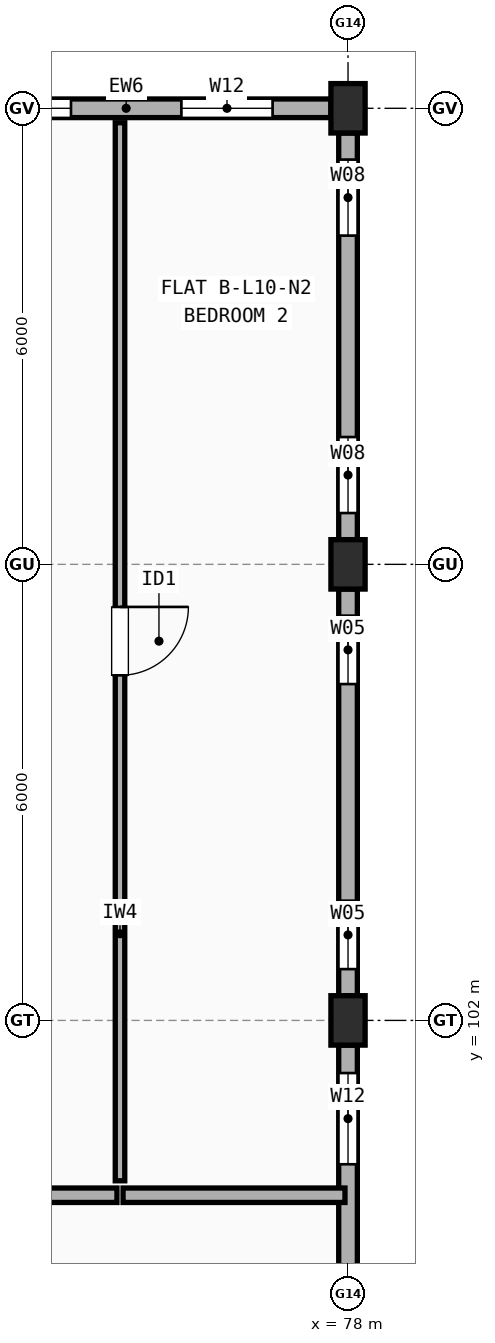
"""IFC4 building model, lengths in metres.
Left out: names, types, materials, properties, quantities, classifications, styles, units other than length and angle.
Written with IfcOpenShell. Run it as: python <this file> out.ifc"""

import sys

from ifc_helpers import new_model, si_unit, direction, frame, frame_2d, origin, origin_2d, place, context, subcontext, project, spatial, rectangle, extrude, element, fill, save


model = new_model("IFC4")
c1 = context("Model", 3, precision=1e-05, world=origin(), true_north=direction((0.0, 1.0)))
c2 = subcontext(c1, "Body", "Model", "MODEL_VIEW")
j1 = project(units=[si_unit("LENGTHUNIT", "METRE"), si_unit("PLANEANGLEUNIT", "RADIAN")], contexts=[c1])
p1 = place(None, origin())
s1 = spatial("IfcSite", under=j1, at=p1, CompositionType="ELEMENT")
p2 = place(p1, origin())
s2 = spatial("IfcBuilding", under=s1, at=p2, CompositionType="ELEMENT")
p3 = place(p2, frame((0.0, 0.0, 33.3)))
s3 = spatial("IfcBuildingStorey", under=s2, at=p3, CompositionType="ELEMENT", Elevation=33.3)
for number, where, z_axis, x_axis in (
    (1, (78.0, 102.0, 0.0), (0.0, 0.0, 1.0), (1.0, 0.0, 0.0)),
    (2, (78.0, 108.0, 0.0), (0.0, 0.0, 1.0), (1.0, 0.0, 0.0)),
    (3, (78.0, 114.0, 0.0), (0.0, 0.0, 1.0), (1.0, 0.0, 0.0)),
):
    element("IfcColumn", number, at=place(p3, frame(where, z_axis=z_axis, x_axis=x_axis)), inside=s3, PredefinedType="COLUMN", context=c2, shape_type="SweptSolid", body=[
        extrude(rectangle(XDim=0.45, YDim=0.65, at=origin_2d()), origin(), (0.0, 0.0, 1.0), 2.99),
    ])
p4 = place(p3, frame((78.0, 96.325, 0.0), z_axis=(0.0, 0.0, 1.0), x_axis=(0.0, 1.0, 0.0)))
e4 = element("IfcWall", 4, at=p4, inside=s3, PredefinedType="STANDARD", context=c2, shape_type="SweptSolid", body=[
    extrude(rectangle(XDim=5.35, YDim=0.245, at=frame_2d((2.675, 0.0))), origin(), (0.0, 0.0, 1.0), 2.472),
])
p5 = place(p4, frame((1.067, 0.0, 0.9)))
e5 = element("IfcOpeningElement", 5, at=p5, cuts=e4, PredefinedType="OPENING", context=c2, shape_type="SweptSolid", body=[
    extrude(rectangle(XDim=1.2, YDim=1.35, at=frame_2d((0.6, 0.675))), frame((0.0, 0.133, 0.0), z_axis=(0.0, -1.0, 0.0), x_axis=(1.0, 0.0, 0.0)), (0.0, 0.0, 1.0), 0.265),
])
p6 = place(p4, frame((3.782, 0.0, 0.9)))
e6 = element("IfcOpeningElement", 6, at=p6, cuts=e4, PredefinedType="OPENING", context=c2, shape_type="SweptSolid", body=[
    extrude(rectangle(XDim=1.2, YDim=1.35, at=frame_2d((0.6, 0.675))), frame((0.0, 0.133, 0.0), z_axis=(0.0, -1.0, 0.0), x_axis=(1.0, 0.0, 0.0)), (0.0, 0.0, 1.0), 0.265),
])
p7 = place(p3, frame((78.0, 102.325, 0.0), z_axis=(0.0, 0.0, 1.0), x_axis=(0.0, 1.0, 0.0)))
e7 = element("IfcWall", 7, at=p7, inside=s3, PredefinedType="STANDARD", context=c2, shape_type="SweptSolid", body=[
    extrude(rectangle(XDim=5.35, YDim=0.245, at=frame_2d((2.675, 0.0))), origin(), (0.0, 0.0, 1.0), 2.472),
])
p8 = place(p7, frame((0.35, 0.0, 0.9)))
e8 = element("IfcOpeningElement", 8, at=p8, cuts=e7, PredefinedType="OPENING", context=c2, shape_type="SweptSolid", body=[
    extrude(rectangle(XDim=0.9, YDim=1.4, at=frame_2d((0.45, 0.7))), frame((0.0, 0.133, 0.0), z_axis=(0.0, -1.0, 0.0), x_axis=(1.0, 0.0, 0.0)), (0.0, 0.0, 1.0), 0.265),
])
p9 = place(p7, frame((4.1, 0.0, 0.9)))
e9 = element("IfcOpeningElement", 9, at=p9, cuts=e7, PredefinedType="OPENING", context=c2, shape_type="SweptSolid", body=[
    extrude(rectangle(XDim=0.9, YDim=1.4, at=frame_2d((0.45, 0.7))), frame((0.0, 0.133, 0.0), z_axis=(0.0, -1.0, 0.0), x_axis=(1.0, 0.0, 0.0)), (0.0, 0.0, 1.0), 0.265),
])
p10 = place(p3, frame((78.0, 108.325, 0.0), z_axis=(0.0, 0.0, 1.0), x_axis=(0.0, 1.0, 0.0)))
e10 = element("IfcWall", 10, at=p10, inside=s3, PredefinedType="STANDARD", context=c2, shape_type="SweptSolid", body=[
    extrude(rectangle(XDim=5.35, YDim=0.245, at=frame_2d((2.675, 0.0))), origin(), (0.0, 0.0, 1.0), 2.472),
])
p11 = place(p10, frame((0.35, 0.0, 0.9)))
e11 = element("IfcOpeningElement", 11, at=p11, cuts=e10, PredefinedType="OPENING", context=c2, shape_type="SweptSolid", body=[
    extrude(rectangle(XDim=1.0, YDim=1.4, at=frame_2d((0.5, 0.7))), frame((0.0, 0.133, 0.0), z_axis=(0.0, -1.0, 0.0), x_axis=(1.0, 0.0, 0.0)), (0.0, 0.0, 1.0), 0.265),
])
p12 = place(p10, frame((4.0, 0.0, 0.9)))
e12 = element("IfcOpeningElement", 12, at=p12, cuts=e10, PredefinedType="OPENING", context=c2, shape_type="SweptSolid", body=[
    extrude(rectangle(XDim=1.0, YDim=1.4, at=frame_2d((0.5, 0.7))), frame((0.0, 0.133, 0.0), z_axis=(0.0, -1.0, 0.0), x_axis=(1.0, 0.0, 0.0)), (0.0, 0.0, 1.0), 0.265),
])
p13 = place(p3, frame((77.775, 114.0, 0.0), z_axis=(0.0, 0.0, 1.0), x_axis=(-1.0, 0.0, 0.0)))
e13 = element("IfcWall", 13, at=p13, inside=s3, PredefinedType="STANDARD", context=c2, shape_type="SweptSolid", body=[
    extrude(rectangle(XDim=5.525, YDim=0.245, at=frame_2d((2.762, 0.0))), origin(), (0.0, 0.0, 1.0), 2.472),
])
p14 = place(p13, frame((0.768, 0.0, 0.9)))
e14 = element("IfcOpeningElement", 14, at=p14, cuts=e13, PredefinedType="OPENING", context=c2, shape_type="SweptSolid", body=[
    extrude(rectangle(XDim=1.2, YDim=1.35, at=frame_2d((0.6, 0.675))), frame((0.0, 0.133, 0.0), z_axis=(0.0, -1.0, 0.0), x_axis=(1.0, 0.0, 0.0)), (0.0, 0.0, 1.0), 0.265),
])
p15 = place(p13, frame((3.42, 0.0, 0.9)))
e15 = element("IfcOpeningElement", 15, at=p15, cuts=e13, PredefinedType="OPENING", context=c2, shape_type="SweptSolid", body=[
    extrude(rectangle(XDim=1.5, YDim=1.4, at=frame_2d((0.75, 0.7))), frame((0.0, 0.133, 0.0), z_axis=(0.0, -1.0, 0.0), x_axis=(1.0, 0.0, 0.0)), (0.0, 0.0, 1.0), 0.265),
])
p16 = place(p3, frame((67.54, 99.7, 0.0), z_axis=(0.0, 0.0, 1.0), x_axis=(1.0, 0.0, 0.0)))
e16 = element("IfcWall", 16, at=p16, inside=s3, PredefinedType="SOLIDWALL", context=c2, shape_type="SweptSolid", body=[
    extrude(rectangle(XDim=7.42, YDim=0.19, at=frame_2d((3.71, 0.0))), origin(), (0.0, 0.0, 1.0), 2.99),
])
p17 = place(p16, frame((3.185, 0.0, 0.0)))
e17 = element("IfcOpeningElement", 17, at=p17, cuts=e16, PredefinedType="OPENING", context=c2, shape_type="SweptSolid", body=[
    extrude(rectangle(XDim=1.05, YDim=2.15, at=frame_2d((0.525, 1.075))), frame((0.0, 0.105, 0.0), z_axis=(0.0, -1.0, 0.0), x_axis=(1.0, 0.0, 0.0)), (0.0, 0.0, 1.0), 0.21),
])
p18 = place(p3, frame((75.04, 99.7, 0.0), z_axis=(0.0, 0.0, 1.0), x_axis=(1.0, 0.0, 0.0)))
e18 = element("IfcWall", 18, at=p18, inside=s3, PredefinedType="SOLIDWALL", context=c2, shape_type="SweptSolid", body=[
    extrude(rectangle(XDim=2.92, YDim=0.19, at=frame_2d((1.46, 0.0))), origin(), (0.0, 0.0, 1.0), 2.472),
])
p19 = place(p3, frame((75.0, 99.89, 0.0), z_axis=(0.0, 0.0, 1.0), x_axis=(0.0, 1.0, 0.0)))
e19 = element("IfcWall", 19, at=p19, inside=s3, PredefinedType="PARTITIONING", context=c2, shape_type="SweptSolid", body=[
    extrude(rectangle(XDim=13.92, YDim=0.125, at=frame_2d((6.96, 0.0))), origin(), (0.0, 0.0, 1.0), 2.472),
])
p20 = place(p19, frame((6.65, 0.0, 0.0)))
e20 = element("IfcOpeningElement", 20, at=p20, cuts=e19, PredefinedType="OPENING", context=c2, shape_type="SweptSolid", body=[
    extrude(rectangle(XDim=0.9, YDim=2.1, at=frame_2d((0.45, 1.05))), frame((0.0, 0.073, 0.0), z_axis=(0.0, -1.0, 0.0), x_axis=(1.0, 0.0, 0.0)), (0.0, 0.0, 1.0), 0.145),
])
p21 = place(p6, origin())
e21 = element("IfcWindow", 21, at=p21, inside=s3, PartitioningType="SINGLE_PANEL", PredefinedType="WINDOW", context=c2, shape_type="SweptSolid", body=[
    extrude(rectangle(XDim=1.2, YDim=1.35, at=frame_2d((0.6, 0.675))), frame((0.0, 0.03, 0.0), z_axis=(0.0, -1.0, 0.0), x_axis=(1.0, 0.0, 0.0)), (0.0, 0.0, 1.0), 0.06),
])
fill(e6, e21)
p22 = place(p8, origin())
e22 = element("IfcWindow", 22, at=p22, inside=s3, PartitioningType="SINGLE_PANEL", PredefinedType="WINDOW", context=c2, shape_type="SweptSolid", body=[
    extrude(rectangle(XDim=0.9, YDim=1.4, at=frame_2d((0.45, 0.7))), frame((0.0, 0.03, 0.0), z_axis=(0.0, -1.0, 0.0), x_axis=(1.0, 0.0, 0.0)), (0.0, 0.0, 1.0), 0.06),
])
fill(e8, e22)
p23 = place(p9, origin())
e23 = element("IfcWindow", 23, at=p23, inside=s3, PartitioningType="SINGLE_PANEL", PredefinedType="WINDOW", context=c2, shape_type="SweptSolid", body=[
    extrude(rectangle(XDim=0.9, YDim=1.4, at=frame_2d((0.45, 0.7))), frame((0.0, 0.03, 0.0), z_axis=(0.0, -1.0, 0.0), x_axis=(1.0, 0.0, 0.0)), (0.0, 0.0, 1.0), 0.06),
])
fill(e9, e23)
p24 = place(p11, origin())
e24 = element("IfcWindow", 24, at=p24, inside=s3, PartitioningType="SINGLE_PANEL", PredefinedType="WINDOW", context=c2, shape_type="SweptSolid", body=[
    extrude(rectangle(XDim=1.0, YDim=1.4, at=frame_2d((0.5, 0.7))), frame((0.0, 0.03, 0.0), z_axis=(0.0, -1.0, 0.0), x_axis=(1.0, 0.0, 0.0)), (0.0, 0.0, 1.0), 0.06),
])
fill(e11, e24)
p25 = place(p12, origin())
e25 = element("IfcWindow", 25, at=p25, inside=s3, PartitioningType="SINGLE_PANEL", PredefinedType="WINDOW", context=c2, shape_type="SweptSolid", body=[
    extrude(rectangle(XDim=1.0, YDim=1.4, at=frame_2d((0.5, 0.7))), frame((0.0, 0.03, 0.0), z_axis=(0.0, -1.0, 0.0), x_axis=(1.0, 0.0, 0.0)), (0.0, 0.0, 1.0), 0.06),
])
fill(e12, e25)
p26 = place(p14, origin())
e26 = element("IfcWindow", 26, at=p26, inside=s3, PartitioningType="SINGLE_PANEL", PredefinedType="WINDOW", context=c2, shape_type="SweptSolid", body=[
    extrude(rectangle(XDim=1.2, YDim=1.35, at=frame_2d((0.6, 0.675))), frame((0.0, 0.03, 0.0), z_axis=(0.0, -1.0, 0.0), x_axis=(1.0, 0.0, 0.0)), (0.0, 0.0, 1.0), 0.06),
])
fill(e14, e26)
p27 = place(p15, origin())
e27 = element("IfcWindow", 27, at=p27, inside=s3, PartitioningType="SINGLE_PANEL", PredefinedType="WINDOW", context=c2, shape_type="SweptSolid", body=[
    extrude(rectangle(XDim=1.5, YDim=1.4, at=frame_2d((0.75, 0.7))), frame((0.0, 0.03, 0.0), z_axis=(0.0, -1.0, 0.0), x_axis=(1.0, 0.0, 0.0)), (0.0, 0.0, 1.0), 0.06),
])
fill(e15, e27)
p28 = place(p20, origin())
e28 = element("IfcDoor", 28, at=p28, inside=s3, OperationType="SINGLE_SWING_RIGHT", PredefinedType="DOOR", context=c2, shape_type="SweptSolid", body=[
    extrude(rectangle(XDim=0.9, YDim=2.1, at=frame_2d((0.45, 1.05))), frame((0.0, 0.025, 0.0), z_axis=(0.0, -1.0, 0.0), x_axis=(1.0, 0.0, 0.0)), (0.0, 0.0, 1.0), 0.05),
])
fill(e20, e28)
save(model, sys.argv[1])
